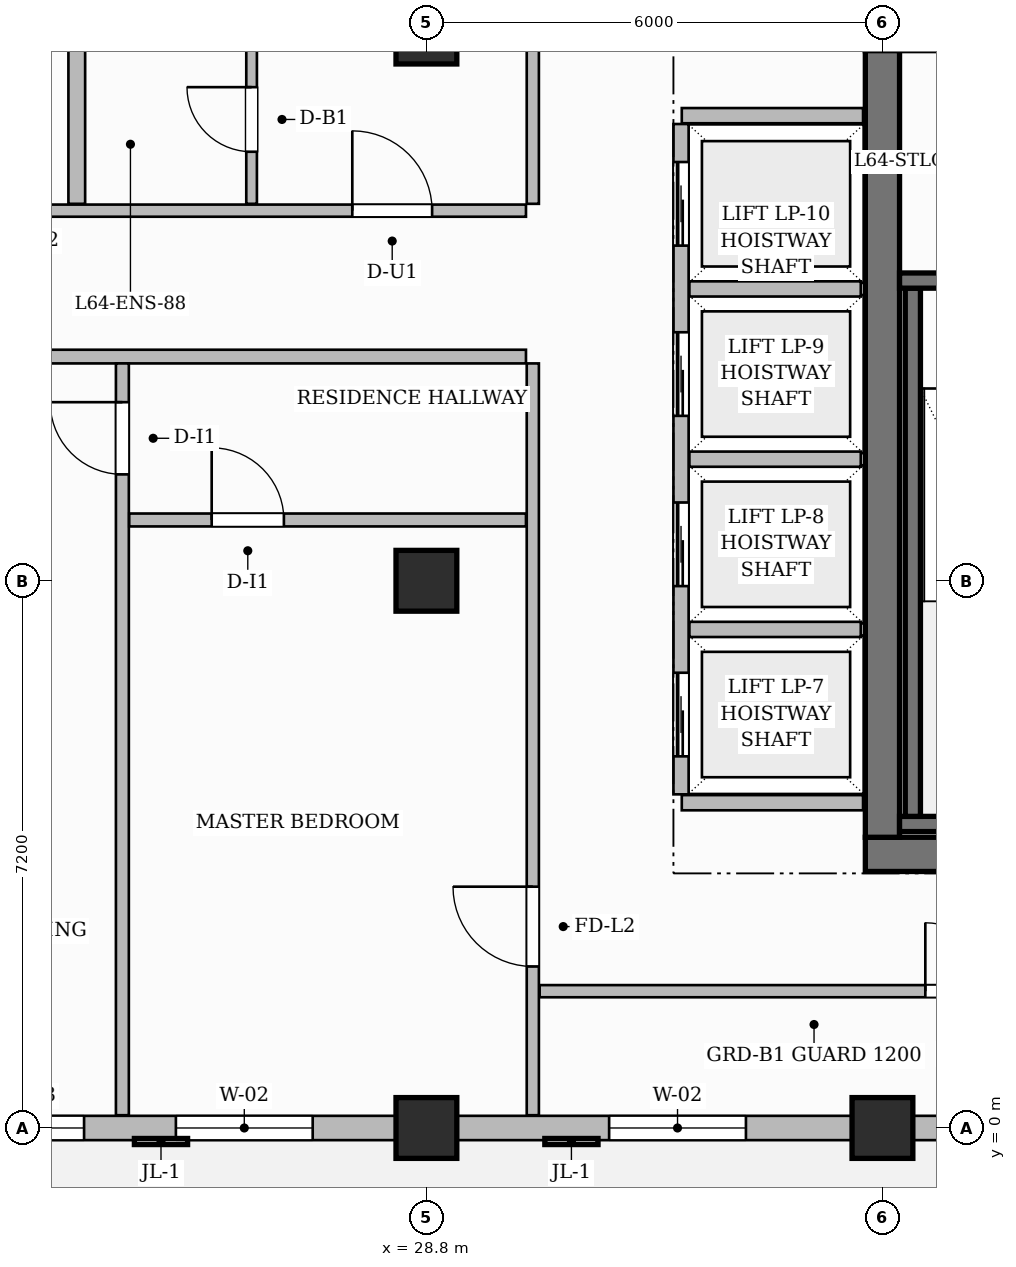
"""IFC4 building model, lengths in metres.
Left out: names, types, materials, properties, quantities, classifications, styles, units other than length and angle.
Written with IfcOpenShell. Run it as: python <this file> out.ifc"""

import sys

from ifc_helpers import new_model, si_unit, direction, frame, frame_2d, origin, origin_2d, place, context, subcontext, project, spatial, rectangle, extrude, source, transform, mapped, element, fill, save


model = new_model("IFC4")
c1 = context("Model", 3, precision=1e-05, world=origin(), true_north=direction((0.0, 1.0)))
c2 = subcontext(c1, "Body", "Model", "MODEL_VIEW")
j1 = project(units=[si_unit("LENGTHUNIT", "METRE"), si_unit("PLANEANGLEUNIT", "RADIAN")], contexts=[c1])
p1 = place(None, origin())
s1 = spatial("IfcSite", under=j1, at=p1, CompositionType="ELEMENT")
p2 = place(p1, origin())
s2 = spatial("IfcBuilding", under=s1, at=p2, CompositionType="ELEMENT")
p3 = place(p2, frame((0.0, 0.0, 255.8)))
s3 = spatial("IfcBuildingStorey", under=s2, at=p3, CompositionType="ELEMENT", Elevation=255.8)
p4 = place(p3, frame((34.575, 3.6, 0.0), z_axis=(0.0, 0.0, 1.0), x_axis=(1.0, 0.0, 0.0)))
e1 = element("IfcWall", 1, at=p4, inside=s3, PredefinedType="SHEAR", context=c2, shape_type="SweptSolid", body=[
    extrude(rectangle(XDim=15.45, YDim=0.45, at=frame_2d((7.725, 0.0))), origin(), (0.0, 0.0, 1.0), 3.85),
])
p5 = place(p4, frame((4.695, 0.0, 0.0)))
e2 = element("IfcOpeningElement", 2, at=p5, cuts=e1, PredefinedType="OPENING", context=c2, shape_type="SweptSolid", body=[
    extrude(rectangle(XDim=0.9, YDim=2.1, at=frame_2d((0.45, 1.05))), frame((0.0, 0.235, 0.0), z_axis=(0.0, -1.0, 0.0), x_axis=(1.0, 0.0, 0.0)), (0.0, 0.0, 1.0), 0.47),
])
p6 = place(p4, frame((7.075, 0.0, 0.0)))
e3 = element("IfcOpeningElement", 3, at=p6, cuts=e1, PredefinedType="OPENING", context=c2, shape_type="SweptSolid", body=[
    extrude(rectangle(XDim=0.9, YDim=2.1, at=frame_2d((0.45, 1.05))), frame((0.0, 0.235, 0.0), z_axis=(0.0, -1.0, 0.0), x_axis=(1.0, 0.0, 0.0)), (0.0, 0.0, 1.0), 0.47),
])
p7 = place(p3, frame((34.8, 3.825, 0.0), z_axis=(0.0, 0.0, 1.0), x_axis=(0.0, 1.0, 0.0)))
e4 = element("IfcWall", 4, at=p7, inside=s3, PredefinedType="SHEAR", context=c2, shape_type="SweptSolid", body=[
    extrude(rectangle(XDim=10.35, YDim=0.45, at=frame_2d((5.175, 0.0))), origin(), (0.0, 0.0, 1.0), 3.85),
])
m1 = source(origin(), c2, "Body", "SweptSolid", [
    extrude(rectangle(XDim=0.8, YDim=0.8, at=origin_2d()), origin(), (0.0, 0.0, 1.0), 3.85),
])
for number, where, z_axis, x_axis in (
    (5, (28.8, 0.0, 0.0), (0.0, 0.0, 1.0), (1.0, 0.0, 0.0)),
    (6, (28.8, 7.2, 0.0), (0.0, 0.0, 1.0), (1.0, 0.0, 0.0)),
    (7, (28.8, 14.4, 0.0), (0.0, 0.0, 1.0), (1.0, 0.0, 0.0)),
    (8, (34.8, 0.0, 0.0), (0.0, 0.0, 1.0), (1.0, 0.0, 0.0)),
):
    element("IfcColumn", number, at=place(p3, frame(where, z_axis=z_axis, x_axis=x_axis)), inside=s3, PredefinedType="COLUMN", context=c2, shape_type="MappedRepresentation", body=[
        mapped(m1, transform((0.0, 0.0, 0.0), scale=1.0)),
    ])
p8 = place(p3, frame((35.025, 4.0, 0.0), z_axis=(0.0, 0.0, 1.0), x_axis=(1.0, 0.0, 0.0)))
e9 = element("IfcWall", 9, at=p8, inside=s3, PredefinedType="SHEAR", context=c2, shape_type="SweptSolid", body=[
    extrude(rectangle(XDim=3.215, YDim=0.2, at=frame_2d((1.607, 0.0))), origin(), (0.0, 0.0, 1.0), 3.85),
])
p9 = place(p3, frame((35.2, 4.1, 0.0), z_axis=(0.0, 0.0, 1.0), x_axis=(0.0, 1.0, 0.0)))
e10 = element("IfcWall", 10, at=p9, inside=s3, PredefinedType="SHEAR", context=c2, shape_type="SweptSolid", body=[
    extrude(rectangle(XDim=6.95, YDim=0.2, at=frame_2d((3.475, 0.0))), origin(), (0.0, 0.0, 1.0), 3.85),
])
p10 = place(p3, frame((35.025, 11.15, 0.0), z_axis=(0.0, 0.0, 1.0), x_axis=(1.0, 0.0, 0.0)))
e11 = element("IfcWall", 11, at=p10, inside=s3, PredefinedType="SHEAR", context=c2, shape_type="SweptSolid", body=[
    extrude(rectangle(XDim=3.215, YDim=0.2, at=frame_2d((1.607, 0.0))), origin(), (0.0, 0.0, 1.0), 3.85),
])
p11 = place(p10, frame((1.12, 0.0, 0.0)))
e12 = element("IfcOpeningElement", 12, at=p11, cuts=e11, PredefinedType="OPENING", context=c2, shape_type="SweptSolid", body=[
    extrude(rectangle(XDim=1.05, YDim=2.2, at=frame_2d((0.525, 1.1))), frame((0.0, 0.11, 0.0), z_axis=(0.0, -1.0, 0.0), x_axis=(1.0, 0.0, 0.0)), (0.0, 0.0, 1.0), 0.22),
])
for number, where, z_axis, x_axis in (
    (13, (32.16, 4.28, 0.0), (0.0, 0.0, 1.0), (1.0, 0.0, 0.0)),
    (14, (32.16, 13.32, 0.0), (0.0, 0.0, 1.0), (1.0, 0.0, 0.0)),
):
    element("IfcWall", number, at=place(p3, frame(where, z_axis=z_axis, x_axis=x_axis)), inside=s3, PredefinedType="PARTITIONING", context=c2, shape_type="SweptSolid", body=[
        extrude(rectangle(XDim=2.385, YDim=0.2, at=frame_2d((1.192, 0.0))), origin(), (0.0, 0.0, 1.0), 3.6),
    ])
p12 = place(p3, frame((32.15, 4.39, 0.0), z_axis=(0.0, 0.0, 1.0), x_axis=(0.0, 1.0, 0.0)))
e15 = element("IfcWall", 15, at=p12, inside=s3, PredefinedType="PARTITIONING", context=c2, shape_type="SweptSolid", body=[
    extrude(rectangle(XDim=8.82, YDim=0.2, at=frame_2d((4.41, 0.0))), origin(), (0.0, 0.0, 1.0), 3.6),
])
p13 = place(p12, frame((0.5, 0.0, 0.0)))
e16 = element("IfcOpeningElement", 16, at=p13, cuts=e15, PredefinedType="OPENING", context=c2, shape_type="SweptSolid", body=[
    extrude(rectangle(XDim=1.1, YDim=2.2, at=frame_2d((0.55, 1.1))), frame((0.0, 0.11, 0.0), z_axis=(0.0, -1.0, 0.0), x_axis=(1.0, 0.0, 0.0)), (0.0, 0.0, 1.0), 0.22),
])
p14 = place(p12, frame((2.74, 0.0, 0.0)))
e17 = element("IfcOpeningElement", 17, at=p14, cuts=e15, PredefinedType="OPENING", context=c2, shape_type="SweptSolid", body=[
    extrude(rectangle(XDim=1.1, YDim=2.2, at=frame_2d((0.55, 1.1))), frame((0.0, 0.11, 0.0), z_axis=(0.0, -1.0, 0.0), x_axis=(1.0, 0.0, 0.0)), (0.0, 0.0, 1.0), 0.22),
])
p15 = place(p12, frame((4.98, 0.0, 0.0)))
e18 = element("IfcOpeningElement", 18, at=p15, cuts=e15, PredefinedType="OPENING", context=c2, shape_type="SweptSolid", body=[
    extrude(rectangle(XDim=1.1, YDim=2.2, at=frame_2d((0.55, 1.1))), frame((0.0, 0.11, 0.0), z_axis=(0.0, -1.0, 0.0), x_axis=(1.0, 0.0, 0.0)), (0.0, 0.0, 1.0), 0.22),
])
p16 = place(p12, frame((7.22, 0.0, 0.0)))
e19 = element("IfcOpeningElement", 19, at=p16, cuts=e15, PredefinedType="OPENING", context=c2, shape_type="SweptSolid", body=[
    extrude(rectangle(XDim=1.1, YDim=2.2, at=frame_2d((0.55, 1.1))), frame((0.0, 0.11, 0.0), z_axis=(0.0, -1.0, 0.0), x_axis=(1.0, 0.0, 0.0)), (0.0, 0.0, 1.0), 0.22),
])
for number, where, z_axis, x_axis in (
    (20, (32.26, 6.56, 0.0), (0.0, 0.0, 1.0), (1.0, 0.0, 0.0)),
    (21, (32.26, 8.8, 0.0), (0.0, 0.0, 1.0), (1.0, 0.0, 0.0)),
    (22, (32.26, 11.04, 0.0), (0.0, 0.0, 1.0), (1.0, 0.0, 0.0)),
):
    element("IfcWall", number, at=place(p3, frame(where, z_axis=z_axis, x_axis=x_axis)), inside=s3, PredefinedType="PARTITIONING", context=c2, shape_type="SweptSolid", body=[
        extrude(rectangle(XDim=2.255, YDim=0.2, at=frame_2d((1.127, 0.0))), origin(), (0.0, 0.0, 1.0), 3.6),
    ])
p17 = place(p3, frame((18.168, 10.15, 0.0), z_axis=(0.0, 0.0, 1.0), x_axis=(1.0, 0.0, 0.0)))
e23 = element("IfcWall", 23, at=p17, inside=s3, PredefinedType="PARTITIONING", context=c2, shape_type="SweptSolid", body=[
    extrude(rectangle(XDim=11.942, YDim=0.18, at=frame_2d((5.971, 0.0))), origin(), (0.0, 0.0, 1.0), 3.6),
])
p18 = place(p17, frame((3.922, 0.0, 0.0)))
e24 = element("IfcOpeningElement", 24, at=p18, cuts=e23, PredefinedType="OPENING", context=c2, shape_type="SweptSolid", body=[
    extrude(rectangle(XDim=1.05, YDim=2.25, at=frame_2d((0.525, 1.125))), frame((0.0, 0.1, 0.0), z_axis=(0.0, -1.0, 0.0), x_axis=(1.0, 0.0, 0.0)), (0.0, 0.0, 1.0), 0.2),
])
p19 = place(p3, frame((18.168, 12.07, 0.0), z_axis=(0.0, 0.0, 1.0), x_axis=(1.0, 0.0, 0.0)))
e25 = element("IfcWall", 25, at=p19, inside=s3, PredefinedType="PARTITIONING", context=c2, shape_type="SweptSolid", body=[
    extrude(rectangle(XDim=11.942, YDim=0.16, at=frame_2d((5.971, 0.0))), origin(), (0.0, 0.0, 1.0), 3.6),
])
p20 = place(p19, frame((3.657, 0.0, 0.0)))
e26 = element("IfcOpeningElement", 26, at=p20, cuts=e25, PredefinedType="OPENING", context=c2, shape_type="SweptSolid", body=[
    extrude(rectangle(XDim=1.0, YDim=2.2, at=frame_2d((0.5, 1.1))), frame((0.0, 0.09, 0.0), z_axis=(0.0, -1.0, 0.0), x_axis=(1.0, 0.0, 0.0)), (0.0, 0.0, 1.0), 0.18),
])
p21 = place(p19, frame((9.657, 0.0, 0.0)))
e27 = element("IfcOpeningElement", 27, at=p21, cuts=e25, PredefinedType="OPENING", context=c2, shape_type="SweptSolid", body=[
    extrude(rectangle(XDim=1.05, YDim=2.25, at=frame_2d((0.525, 1.125))), frame((0.0, 0.09, 0.0), z_axis=(0.0, -1.0, 0.0), x_axis=(1.0, 0.0, 0.0)), (0.0, 0.0, 1.0), 0.18),
])
p22 = place(p3, frame((30.2, 12.16, 0.0), z_axis=(0.0, 0.0, 1.0), x_axis=(0.0, 1.0, 0.0)))
e28 = element("IfcWall", 28, at=p22, inside=s3, PredefinedType="PARTITIONING", context=c2, shape_type="SweptSolid", body=[
    extrude(rectangle(XDim=9.3, YDim=0.16, at=frame_2d((4.65, 0.0))), origin(), (0.0, 0.0, 1.0), 3.6),
])
p23 = place(p3, frame((30.2, 0.168, 0.0), z_axis=(0.0, 0.0, 1.0), x_axis=(0.0, 1.0, 0.0)))
e29 = element("IfcWall", 29, at=p23, inside=s3, PredefinedType="PARTITIONING", context=c2, shape_type="SweptSolid", body=[
    extrude(rectangle(XDim=9.892, YDim=0.16, at=frame_2d((4.946, 0.0))), origin(), (0.0, 0.0, 1.0), 3.6),
])
p24 = place(p23, frame((1.957, 0.0, 0.0)))
e30 = element("IfcOpeningElement", 30, at=p24, cuts=e29, PredefinedType="OPENING", context=c2, shape_type="SweptSolid", body=[
    extrude(rectangle(XDim=1.05, YDim=2.15, at=frame_2d((0.525, 1.075))), frame((0.0, 0.09, 0.0), z_axis=(0.0, -1.0, 0.0), x_axis=(1.0, 0.0, 0.0)), (0.0, 0.0, 1.0), 0.18),
])
p25 = place(p3, frame((30.29, 1.8, 0.0), z_axis=(0.0, 0.0, 1.0), x_axis=(1.0, 0.0, 0.0)))
e31 = element("IfcWall", 31, at=p25, inside=s3, PredefinedType="PARTITIONING", context=c2, shape_type="SweptSolid", body=[
    extrude(rectangle(XDim=19.37, YDim=0.16, at=frame_2d((9.685, 0.0))), origin(), (0.0, 0.0, 1.0), 3.6),
])
p26 = place(p25, frame((5.074, 0.0, 0.0)))
e32 = element("IfcOpeningElement", 32, at=p26, cuts=e31, PredefinedType="OPENING", context=c2, shape_type="SweptSolid", body=[
    extrude(rectangle(XDim=0.9, YDim=2.15, at=frame_2d((0.45, 1.075))), frame((0.0, 0.09, 0.0), z_axis=(0.0, -1.0, 0.0), x_axis=(1.0, 0.0, 0.0)), (0.0, 0.0, 1.0), 0.18),
])
p27 = place(p25, frame((14.06, 0.0, 0.0)))
e33 = element("IfcOpeningElement", 33, at=p27, cuts=e31, PredefinedType="OPENING", context=c2, shape_type="SweptSolid", body=[
    extrude(rectangle(XDim=0.9, YDim=2.15, at=frame_2d((0.45, 1.075))), frame((0.0, 0.09, 0.0), z_axis=(0.0, -1.0, 0.0), x_axis=(1.0, 0.0, 0.0)), (0.0, 0.0, 1.0), 0.18),
])
p28 = place(p3, frame((24.8, 0.168, 0.0), z_axis=(0.0, 0.0, 1.0), x_axis=(0.0, 1.0, 0.0)))
e34 = element("IfcWall", 34, at=p28, inside=s3, PredefinedType="PARTITIONING", context=c2, shape_type="SweptSolid", body=[
    extrude(rectangle(XDim=9.892, YDim=0.17, at=frame_2d((4.946, 0.0))), origin(), (0.0, 0.0, 1.0), 3.6),
])
p29 = place(p28, frame((8.432, 0.0, 0.0)))
e35 = element("IfcOpeningElement", 35, at=p29, cuts=e34, PredefinedType="OPENING", context=c2, shape_type="SweptSolid", body=[
    extrude(rectangle(XDim=0.95, YDim=2.15, at=frame_2d((0.475, 1.075))), frame((0.0, 0.095, 0.0), z_axis=(0.0, -1.0, 0.0), x_axis=(1.0, 0.0, 0.0)), (0.0, 0.0, 1.0), 0.19),
])
p30 = place(p3, frame((24.89, 8.0, 0.0), z_axis=(0.0, 0.0, 1.0), x_axis=(1.0, 0.0, 0.0)))
e36 = element("IfcWall", 36, at=p30, inside=s3, PredefinedType="PARTITIONING", context=c2, shape_type="SweptSolid", body=[
    extrude(rectangle(XDim=5.22, YDim=0.17, at=frame_2d((2.61, 0.0))), origin(), (0.0, 0.0, 1.0), 3.6),
])
p31 = place(p30, frame((1.085, 0.0, 0.0)))
e37 = element("IfcOpeningElement", 37, at=p31, cuts=e36, PredefinedType="OPENING", context=c2, shape_type="SweptSolid", body=[
    extrude(rectangle(XDim=0.95, YDim=2.15, at=frame_2d((0.475, 1.075))), frame((0.0, 0.095, 0.0), z_axis=(0.0, -1.0, 0.0), x_axis=(1.0, 0.0, 0.0)), (0.0, 0.0, 1.0), 0.19),
])
p32 = place(p3, frame((24.2, 12.16, 0.0), z_axis=(0.0, 0.0, 1.0), x_axis=(0.0, 1.0, 0.0)))
e38 = element("IfcWall", 38, at=p32, inside=s3, PredefinedType="PARTITIONING", context=c2, shape_type="SweptSolid", body=[
    extrude(rectangle(XDim=9.272, YDim=0.22, at=frame_2d((4.636, 0.0))), origin(), (0.0, 0.0, 1.0), 3.6),
])
p33 = place(p3, frame((26.5, 12.16, 0.0), z_axis=(0.0, 0.0, 1.0), x_axis=(0.0, 1.0, 0.0)))
e39 = element("IfcWall", 39, at=p33, inside=s3, PredefinedType="PARTITIONING", context=c2, shape_type="SweptSolid", body=[
    extrude(rectangle(XDim=2.22, YDim=0.14, at=frame_2d((1.11, 0.0))), origin(), (0.0, 0.0, 1.0), 3.6),
])
p34 = place(p33, frame((0.685, 0.0, 0.0)))
e40 = element("IfcOpeningElement", 40, at=p34, cuts=e39, PredefinedType="OPENING", context=c2, shape_type="SweptSolid", body=[
    extrude(rectangle(XDim=0.85, YDim=2.1, at=frame_2d((0.425, 1.05))), frame((0.0, 0.08, 0.0), z_axis=(0.0, -1.0, 0.0), x_axis=(1.0, 0.0, 0.0)), (0.0, 0.0, 1.0), 0.16),
])
p35 = place(p3, frame((18.0, 0.0, 0.0), z_axis=(0.0, 0.0, 1.0), x_axis=(1.0, 0.0, 0.0)))
e41 = element("IfcWall", 41, at=p35, inside=s3, PredefinedType="SOLIDWALL", context=c2, shape_type="SweptSolid", body=[
    extrude(rectangle(XDim=31.8, YDim=0.32, at=frame_2d((15.9, 0.0))), origin(), (0.0, 0.0, 1.0), 3.135),
])
p36 = place(p35, frame((0.42, 0.0, 0.0)))
e42 = element("IfcOpeningElement", 42, at=p36, cuts=e41, PredefinedType="OPENING", context=c2, shape_type="SweptSolid", body=[
    extrude(rectangle(XDim=1.2, YDim=2.2, at=frame_2d((0.6, 1.1))), frame((0.0, 0.17, 0.0), z_axis=(0.0, -1.0, 0.0), x_axis=(1.0, 0.0, 0.0)), (0.0, 0.0, 1.0), 0.34),
])
p37 = place(p35, frame((4.896, 0.0, 0.8)))
e43 = element("IfcOpeningElement", 43, at=p37, cuts=e41, PredefinedType="OPENING", context=c2, shape_type="SweptSolid", body=[
    extrude(rectangle(XDim=1.4, YDim=1.85, at=frame_2d((0.7, 0.925))), frame((0.0, 0.17, 0.0), z_axis=(0.0, -1.0, 0.0), x_axis=(1.0, 0.0, 0.0)), (0.0, 0.0, 1.0), 0.34),
])
p38 = place(p35, frame((7.504, 0.0, 0.8)))
e44 = element("IfcOpeningElement", 44, at=p38, cuts=e41, PredefinedType="OPENING", context=c2, shape_type="SweptSolid", body=[
    extrude(rectangle(XDim=1.8, YDim=1.85, at=frame_2d((0.9, 0.925))), frame((0.0, 0.17, 0.0), z_axis=(0.0, -1.0, 0.0), x_axis=(1.0, 0.0, 0.0)), (0.0, 0.0, 1.0), 0.34),
])
p39 = place(p35, frame((13.204, 0.0, 0.8)))
e45 = element("IfcOpeningElement", 45, at=p39, cuts=e41, PredefinedType="OPENING", context=c2, shape_type="SweptSolid", body=[
    extrude(rectangle(XDim=1.8, YDim=1.85, at=frame_2d((0.9, 0.925))), frame((0.0, 0.17, 0.0), z_axis=(0.0, -1.0, 0.0), x_axis=(1.0, 0.0, 0.0)), (0.0, 0.0, 1.0), 0.34),
])
p40 = place(p35, frame((18.796, 0.0, 0.8)))
e46 = element("IfcOpeningElement", 46, at=p40, cuts=e41, PredefinedType="OPENING", context=c2, shape_type="SweptSolid", body=[
    extrude(rectangle(XDim=1.8, YDim=1.85, at=frame_2d((0.9, 0.925))), frame((0.0, 0.17, 0.0), z_axis=(0.0, -1.0, 0.0), x_axis=(1.0, 0.0, 0.0)), (0.0, 0.0, 1.0), 0.34),
])
p41 = place(p35, frame((22.029, 0.0, 0.8)))
e47 = element("IfcOpeningElement", 47, at=p41, cuts=e41, PredefinedType="OPENING", context=c2, shape_type="SweptSolid", body=[
    extrude(rectangle(XDim=0.95, YDim=1.75, at=frame_2d((0.475, 0.875))), frame((0.0, 0.17, 0.0), z_axis=(0.0, -1.0, 0.0), x_axis=(1.0, 0.0, 0.0)), (0.0, 0.0, 1.0), 0.34),
])
p42 = place(p35, frame((25.475, 0.0, 0.8)))
e48 = element("IfcOpeningElement", 48, at=p42, cuts=e41, PredefinedType="OPENING", context=c2, shape_type="SweptSolid", body=[
    extrude(rectangle(XDim=1.8, YDim=1.85, at=frame_2d((0.9, 0.925))), frame((0.0, 0.17, 0.0), z_axis=(0.0, -1.0, 0.0), x_axis=(1.0, 0.0, 0.0)), (0.0, 0.0, 1.0), 0.34),
])
p43 = place(p35, frame((28.525, 0.0, 0.8)))
e49 = element("IfcOpeningElement", 49, at=p43, cuts=e41, PredefinedType="OPENING", context=c2, shape_type="SweptSolid", body=[
    extrude(rectangle(XDim=1.8, YDim=1.85, at=frame_2d((0.9, 0.925))), frame((0.0, 0.17, 0.0), z_axis=(0.0, -1.0, 0.0), x_axis=(1.0, 0.0, 0.0)), (0.0, 0.0, 1.0), 0.34),
])
m2 = source(origin(), c2, "Body", "SweptSolid", [
    extrude(rectangle(XDim=1.05, YDim=2.15, at=frame_2d((0.525, 1.075))), frame((0.0, 0.025, 0.0), z_axis=(0.0, -1.0, 0.0), x_axis=(1.0, 0.0, 0.0)), (0.0, 0.0, 1.0), 0.05),
])
p44 = place(p24, origin())
e50 = element("IfcDoor", 50, at=p44, inside=s3, OperationType="SINGLE_SWING_RIGHT", PredefinedType="DOOR", context=c2, shape_type="MappedRepresentation", body=[
    mapped(m2, transform((0.0, 0.0, 0.0), scale=1.0)),
])
fill(e30, e50)
m3 = source(origin(), c2, "Body", "SweptSolid", [
    extrude(rectangle(XDim=0.9, YDim=2.15, at=frame_2d((0.45, 1.075))), frame((0.0, 0.025, 0.0), z_axis=(0.0, -1.0, 0.0), x_axis=(1.0, 0.0, 0.0)), (0.0, 0.0, 1.0), 0.05),
])
p45 = place(p26, origin())
e51 = element("IfcDoor", 51, at=p45, inside=s3, OperationType="SINGLE_SWING_LEFT", PredefinedType="DOOR", context=c2, shape_type="MappedRepresentation", body=[
    mapped(m3, transform((0.0, 0.0, 0.0), scale=1.0)),
])
fill(e32, e51)
m4 = source(origin(), c2, "Body", "SweptSolid", [
    extrude(rectangle(XDim=0.95, YDim=2.15, at=frame_2d((0.475, 1.075))), frame((0.0, 0.025, 0.0), z_axis=(0.0, -1.0, 0.0), x_axis=(1.0, 0.0, 0.0)), (0.0, 0.0, 1.0), 0.05),
])
p46 = place(p29, origin())
e52 = element("IfcDoor", 52, at=p46, inside=s3, OperationType="SINGLE_SWING_RIGHT", PredefinedType="DOOR", context=c2, shape_type="MappedRepresentation", body=[
    mapped(m4, transform((0.0, 0.0, 0.0), scale=1.0)),
])
fill(e35, e52)
p47 = place(p31, origin())
e53 = element("IfcDoor", 53, at=p47, inside=s3, OperationType="SINGLE_SWING_LEFT", PredefinedType="DOOR", context=c2, shape_type="MappedRepresentation", body=[
    mapped(m4, transform((0.0, 0.0, 0.0), scale=1.0)),
])
fill(e37, e53)
m5 = source(origin(), c2, "Body", "SweptSolid", [
    extrude(rectangle(XDim=0.85, YDim=2.1, at=frame_2d((0.425, 1.05))), frame((0.0, 0.025, 0.0), z_axis=(0.0, -1.0, 0.0), x_axis=(1.0, 0.0, 0.0)), (0.0, 0.0, 1.0), 0.05),
])
p48 = place(p34, origin())
e54 = element("IfcDoor", 54, at=p48, inside=s3, OperationType="SINGLE_SWING_RIGHT", PredefinedType="DOOR", context=c2, shape_type="MappedRepresentation", body=[
    mapped(m5, transform((0.0, 0.0, 0.0), scale=1.0)),
])
fill(e40, e54)
m6 = source(origin(), c2, "Body", "SweptSolid", [
    extrude(rectangle(XDim=1.05, YDim=2.25, at=frame_2d((0.525, 1.125))), frame((0.0, 0.025, 0.0), z_axis=(0.0, -1.0, 0.0), x_axis=(1.0, 0.0, 0.0)), (0.0, 0.0, 1.0), 0.05),
])
p49 = place(p21, origin())
e55 = element("IfcDoor", 55, at=p49, inside=s3, OperationType="SINGLE_SWING_LEFT", PredefinedType="DOOR", context=c2, shape_type="MappedRepresentation", body=[
    mapped(m6, transform((0.0, 0.0, 0.0), scale=1.0)),
])
fill(e27, e55)
m7 = source(origin(), c2, "Body", "SweptSolid", [
    extrude(rectangle(XDim=1.1, YDim=2.2, at=frame_2d((0.55, 1.1))), frame((0.0, 0.025, 0.0), z_axis=(0.0, -1.0, 0.0), x_axis=(1.0, 0.0, 0.0)), (0.0, 0.0, 1.0), 0.05),
])
p50 = place(p13, origin())
e56 = element("IfcDoor", 56, at=p50, inside=s3, OperationType="SLIDING_TO_LEFT", PredefinedType="DOOR", context=c2, shape_type="MappedRepresentation", body=[
    mapped(m7, transform((0.0, 0.0, 0.0), scale=1.0)),
])
fill(e16, e56)
p51 = place(p14, origin())
e57 = element("IfcDoor", 57, at=p51, inside=s3, OperationType="SLIDING_TO_LEFT", PredefinedType="DOOR", context=c2, shape_type="MappedRepresentation", body=[
    mapped(m7, transform((0.0, 0.0, 0.0), scale=1.0)),
])
fill(e17, e57)
p52 = place(p15, origin())
e58 = element("IfcDoor", 58, at=p52, inside=s3, OperationType="SLIDING_TO_LEFT", PredefinedType="DOOR", context=c2, shape_type="MappedRepresentation", body=[
    mapped(m7, transform((0.0, 0.0, 0.0), scale=1.0)),
])
fill(e18, e58)
p53 = place(p16, origin())
e59 = element("IfcDoor", 59, at=p53, inside=s3, OperationType="SLIDING_TO_LEFT", PredefinedType="DOOR", context=c2, shape_type="MappedRepresentation", body=[
    mapped(m7, transform((0.0, 0.0, 0.0), scale=1.0)),
])
fill(e19, e59)
m8 = source(origin(), c2, "Body", "SweptSolid", [
    extrude(rectangle(XDim=1.4, YDim=1.85, at=frame_2d((0.7, 0.925))), frame((0.0, 0.03, 0.0), z_axis=(0.0, -1.0, 0.0), x_axis=(1.0, 0.0, 0.0)), (0.0, 0.0, 1.0), 0.06),
])
p54 = place(p37, origin())
e60 = element("IfcWindow", 60, at=p54, inside=s3, PartitioningType="SINGLE_PANEL", PredefinedType="WINDOW", context=c2, shape_type="MappedRepresentation", body=[
    mapped(m8, transform((0.0, 0.0, 0.0), scale=1.0)),
])
fill(e43, e60)
m9 = source(origin(), c2, "Body", "SweptSolid", [
    extrude(rectangle(XDim=1.8, YDim=1.85, at=frame_2d((0.9, 0.925))), frame((0.0, 0.03, 0.0), z_axis=(0.0, -1.0, 0.0), x_axis=(1.0, 0.0, 0.0)), (0.0, 0.0, 1.0), 0.06),
])
p55 = place(p38, origin())
e61 = element("IfcWindow", 61, at=p55, inside=s3, PartitioningType="DOUBLE_PANEL_VERTICAL", PredefinedType="WINDOW", context=c2, shape_type="MappedRepresentation", body=[
    mapped(m9, transform((0.0, 0.0, 0.0), scale=1.0)),
])
fill(e44, e61)
p56 = place(p39, origin())
e62 = element("IfcWindow", 62, at=p56, inside=s3, PartitioningType="DOUBLE_PANEL_VERTICAL", PredefinedType="WINDOW", context=c2, shape_type="MappedRepresentation", body=[
    mapped(m9, transform((0.0, 0.0, 0.0), scale=1.0)),
])
fill(e45, e62)
save(model, sys.argv[1])
